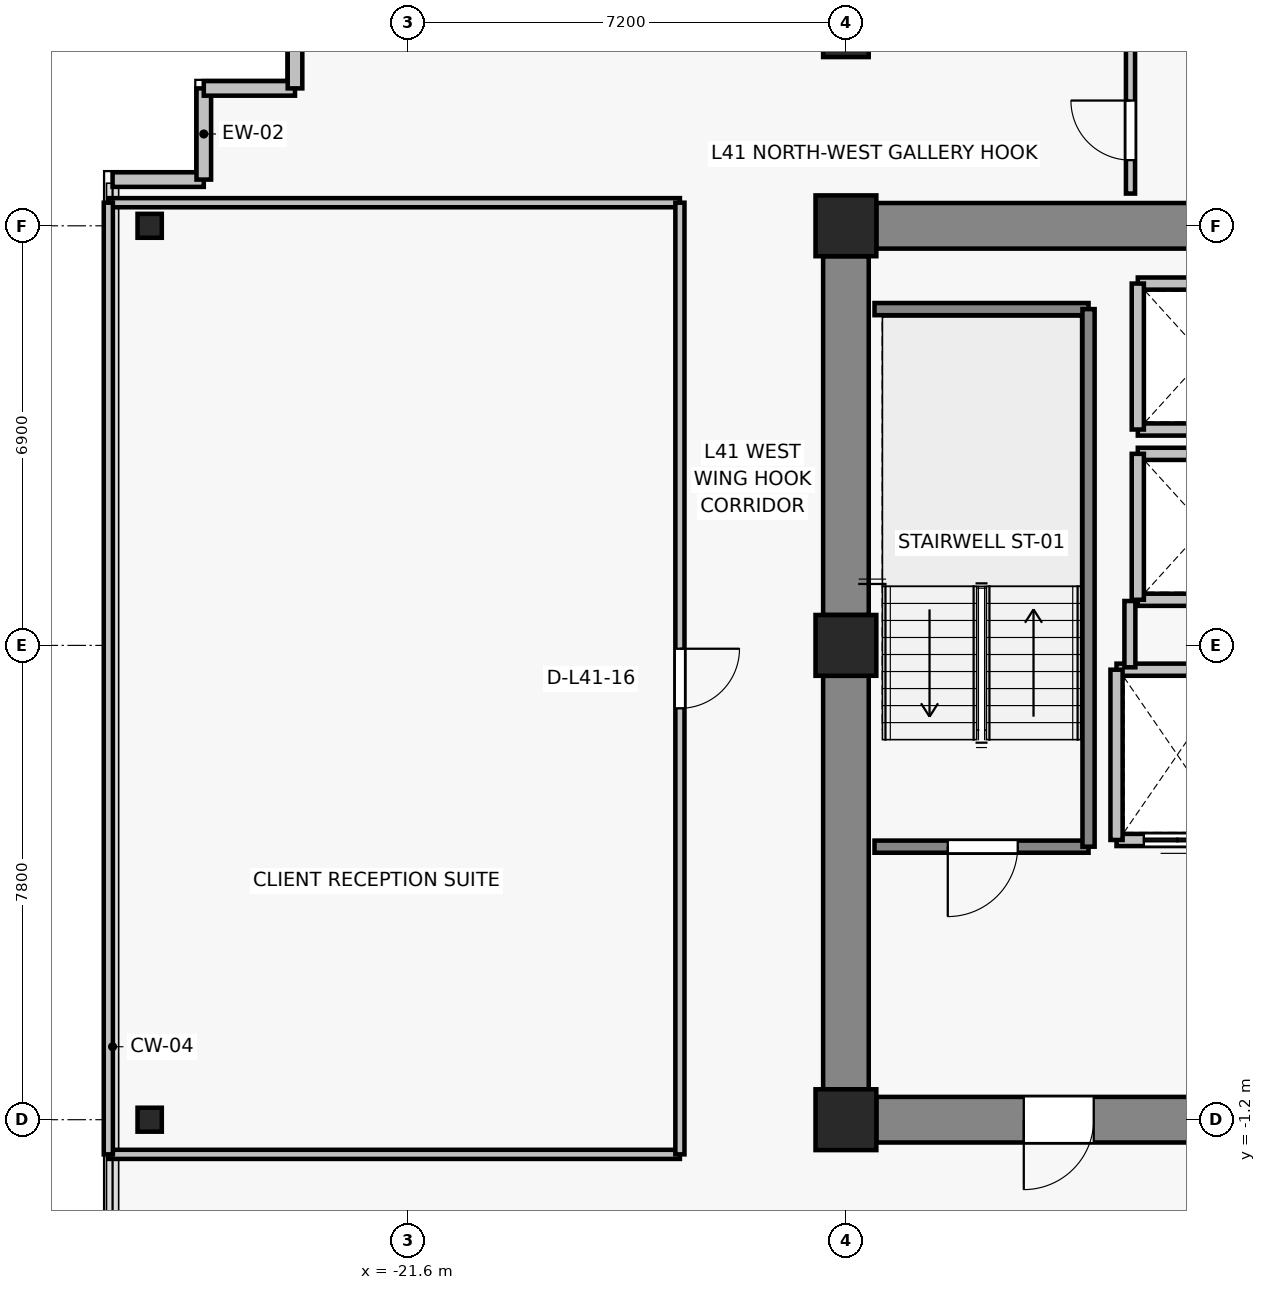
"""IFC4 building model, lengths in metres.
Left out: names, types, materials, properties, quantities, classifications, styles, units other than length and angle.
Written with IfcOpenShell. Run it as: python <this file> out.ifc"""

import sys

from ifc_helpers import new_model, si_unit, direction, frame, frame_2d, origin, origin_2d, place, context, subcontext, project, spatial, rectangle, i_section, extrude, source, transform, mapped, element, fill, save


model = new_model("IFC4")
c1 = context("Model", 3, precision=1e-05, world=origin(), true_north=direction((0.0, 1.0)))
c2 = subcontext(c1, "Body", "Model", "MODEL_VIEW")
j1 = project(units=[si_unit("LENGTHUNIT", "METRE"), si_unit("PLANEANGLEUNIT", "RADIAN")], contexts=[c1])
p1 = place(None, origin())
s1 = spatial("IfcSite", under=j1, at=p1, CompositionType="ELEMENT")
p2 = place(p1, origin())
s2 = spatial("IfcBuilding", under=s1, at=p2, CompositionType="ELEMENT")
p3 = place(p2, frame((0.0, 0.0, 149.5)))
s3 = spatial("IfcBuildingStorey", under=s2, at=p3, CompositionType="ELEMENT", Elevation=149.5)
for number, where, z_axis, x_axis in (
    (1, (-14.4, -1.2, 0.0), (0.0, 0.0, 1.0), (1.0, 0.0, 0.0)),
    (2, (-14.4, 6.6, 0.0), (0.0, 0.0, 1.0), (1.0, 0.0, 0.0)),
    (3, (-14.4, 13.5, 0.0), (0.0, 0.0, 1.0), (1.0, 0.0, 0.0)),
):
    element("IfcColumn", number, at=place(p3, frame(where, z_axis=z_axis, x_axis=x_axis)), inside=s3, PredefinedType="COLUMN", context=c2, shape_type="SweptSolid", body=[
        extrude(rectangle(XDim=1.0, YDim=1.0, at=origin_2d()), origin(), (0.0, 0.0, 1.0), 3.3),
    ])
p4 = place(p3, frame((-14.4, 16.65, 0.0), z_axis=(0.0, 0.0, 1.0), x_axis=(1.0, 0.0, 0.0)))
e4 = element("IfcColumn", 4, at=p4, inside=s3, PredefinedType="COLUMN", context=c2, shape_type="SweptSolid", body=[
    extrude(rectangle(XDim=0.75, YDim=0.75, at=origin_2d()), origin(), (0.0, 0.0, 1.0), 3.3),
])
for number, where, z_axis, x_axis in (
    (5, (-25.85, -1.2, 0.0), (0.0, 0.0, 1.0), (1.0, 0.0, 0.0)),
    (6, (-25.85, 13.5, 0.0), (0.0, 0.0, 1.0), (1.0, 0.0, 0.0)),
):
    element("IfcColumn", number, at=place(p3, frame(where, z_axis=z_axis, x_axis=x_axis)), inside=s3, PredefinedType="COLUMN", context=c2, shape_type="SweptSolid", body=[
        extrude(i_section(OverallWidth=0.399, OverallDepth=0.394, WebThickness=0.023, FlangeThickness=0.037, FilletRadius=0.015, at=origin_2d()), origin(), (0.0, 0.0, 1.0), 3.3),
    ])
p5 = place(p3, frame((-13.9, 13.5, 0.0), z_axis=(0.0, 0.0, 1.0), x_axis=(1.0, 0.0, 0.0)))
e7 = element("IfcWall", 7, at=p5, inside=s3, PredefinedType="SHEAR", context=c2, shape_type="SweptSolid", body=[
    extrude(rectangle(XDim=6.2, YDim=0.75, at=frame_2d((3.1, 0.0))), origin(), (0.0, 0.0, 1.0), 3.075),
])
p6 = place(p3, frame((-14.4, -0.7, 0.0), z_axis=(0.0, 0.0, 1.0), x_axis=(0.0, 1.0, 0.0)))
e8 = element("IfcWall", 8, at=p6, inside=s3, PredefinedType="SHEAR", context=c2, shape_type="SweptSolid", body=[
    extrude(rectangle(XDim=6.8, YDim=0.75, at=frame_2d((3.4, 0.0))), origin(), (0.0, 0.0, 1.0), 3.075),
])
p7 = place(p3, frame((-14.4, 7.1, 0.0), z_axis=(0.0, 0.0, 1.0), x_axis=(0.0, 1.0, 0.0)))
e9 = element("IfcWall", 9, at=p7, inside=s3, PredefinedType="SHEAR", context=c2, shape_type="SweptSolid", body=[
    extrude(rectangle(XDim=5.9, YDim=0.75, at=frame_2d((2.95, 0.0))), origin(), (0.0, 0.0, 1.0), 3.075),
])
p8 = place(p3, frame((-7.7, -1.2, 0.0), z_axis=(0.0, 0.0, 1.0), x_axis=(-1.0, 0.0, 0.0)))
e10 = element("IfcWall", 10, at=p8, inside=s3, PredefinedType="SHEAR", context=c2, shape_type="SweptSolid", body=[
    extrude(rectangle(XDim=6.2, YDim=0.75, at=frame_2d((3.1, 0.0))), origin(), (0.0, 0.0, 1.0), 3.075),
])
p9 = place(p8, frame((2.625, 0.0, 0.0)))
e11 = element("IfcOpeningElement", 11, at=p9, cuts=e10, PredefinedType="OPENING", context=c2, shape_type="SweptSolid", body=[
    extrude(rectangle(XDim=1.15, YDim=2.15, at=frame_2d((0.575, 1.075))), frame((0.0, 0.385, 0.0), z_axis=(0.0, -1.0, 0.0), x_axis=(1.0, 0.0, 0.0)), (0.0, 0.0, 1.0), 0.77),
])
for number, where, z_axis, x_axis in (
    (12, (-24.96, 14.26, 0.0), (0.0, 0.0, 1.0), (-1.0, 0.0, 0.0)),
    (13, (-24.96, 15.76, 0.0), (0.0, 0.0, 1.0), (0.0, -1.0, 0.0)),
    (14, (-23.46, 15.76, 0.0), (0.0, 0.0, 1.0), (-1.0, 0.0, 0.0)),
    (15, (-23.46, 17.26, 0.0), (0.0, 0.0, 1.0), (0.0, -1.0, 0.0)),
):
    element("IfcWall", number, at=place(p3, frame(where, z_axis=z_axis, x_axis=x_axis)), inside=s3, PredefinedType="SOLIDWALL", context=c2, shape_type="SweptSolid", body=[
        extrude(rectangle(XDim=1.5, YDim=0.24, at=frame_2d((0.75, 0.0))), origin(), (0.0, 0.0, 1.0), 3.075),
    ])
p10 = place(p3, frame((-7.95, 3.4, 0.0), z_axis=(0.0, 0.0, 1.0), x_axis=(-1.0, 0.0, 0.0)))
e16 = element("IfcWall", 16, at=p10, inside=s3, PredefinedType="SOLIDWALL", context=c2, shape_type="SweptSolid", body=[
    extrude(rectangle(XDim=2.0, YDim=0.2, at=frame_2d((1.0, 0.0))), origin(), (0.0, 0.0, 1.0), 3.075),
])
p11 = place(p10, frame((0.45, 0.0, 0.0)))
e17 = element("IfcOpeningElement", 17, at=p11, cuts=e16, PredefinedType="OPENING", context=c2, shape_type="SweptSolid", body=[
    extrude(rectangle(XDim=1.1, YDim=2.2, at=frame_2d((0.55, 1.1))), frame((0.0, 0.11, 0.0), z_axis=(0.0, -1.0, 0.0), x_axis=(1.0, 0.0, 0.0)), (0.0, 0.0, 1.0), 0.22),
])
p12 = place(p3, frame((-9.95, 6.2, 0.0), z_axis=(0.0, 0.0, 1.0), x_axis=(1.0, 0.0, 0.0)))
e18 = element("IfcWall", 18, at=p12, inside=s3, PredefinedType="SOLIDWALL", context=c2, shape_type="SweptSolid", body=[
    extrude(rectangle(XDim=2.0, YDim=0.2, at=frame_2d((1.0, 0.0))), origin(), (0.0, 0.0, 1.0), 3.075),
])
p13 = place(p3, frame((-9.95, 3.4, 0.0), z_axis=(0.0, 0.0, 1.0), x_axis=(0.0, 1.0, 0.0)))
e19 = element("IfcWall", 19, at=p13, inside=s3, PredefinedType="SOLIDWALL", context=c2, shape_type="SweptSolid", body=[
    extrude(rectangle(XDim=2.8, YDim=0.2, at=frame_2d((1.4, 0.0))), origin(), (0.0, 0.0, 1.0), 3.075),
])
for number, where, z_axis, x_axis in (
    (20, (-7.4, 7.35, 0.0), (0.0, 0.0, 1.0), (-1.0, 0.0, 0.0)),
    (21, (-9.6, 9.75, 0.0), (0.0, 0.0, 1.0), (1.0, 0.0, 0.0)),
):
    element("IfcWall", number, at=place(p3, frame(where, z_axis=z_axis, x_axis=x_axis)), inside=s3, PredefinedType="SOLIDWALL", context=c2, shape_type="SweptSolid", body=[
        extrude(rectangle(XDim=2.2, YDim=0.2, at=frame_2d((1.1, 0.0))), origin(), (0.0, 0.0, 1.0), 2.565),
    ])
p14 = place(p3, frame((-9.6, 7.35, 0.0), z_axis=(0.0, 0.0, 1.0), x_axis=(0.0, 1.0, 0.0)))
e22 = element("IfcWall", 22, at=p14, inside=s3, PredefinedType="SOLIDWALL", context=c2, shape_type="SweptSolid", body=[
    extrude(rectangle(XDim=2.4, YDim=0.2, at=frame_2d((1.2, 0.0))), origin(), (0.0, 0.0, 1.0), 3.075),
])
for number, where, z_axis, x_axis in (
    (23, (-7.4, 10.15, 0.0), (0.0, 0.0, 1.0), (-1.0, 0.0, 0.0)),
    (24, (-9.6, 12.55, 0.0), (0.0, 0.0, 1.0), (1.0, 0.0, 0.0)),
):
    element("IfcWall", number, at=place(p3, frame(where, z_axis=z_axis, x_axis=x_axis)), inside=s3, PredefinedType="SOLIDWALL", context=c2, shape_type="SweptSolid", body=[
        extrude(rectangle(XDim=2.2, YDim=0.2, at=frame_2d((1.1, 0.0))), origin(), (0.0, 0.0, 1.0), 2.565),
    ])
p15 = place(p3, frame((-9.6, 10.15, 0.0), z_axis=(0.0, 0.0, 1.0), x_axis=(0.0, 1.0, 0.0)))
e25 = element("IfcWall", 25, at=p15, inside=s3, PredefinedType="SOLIDWALL", context=c2, shape_type="SweptSolid", body=[
    extrude(rectangle(XDim=2.4, YDim=0.2, at=frame_2d((1.2, 0.0))), origin(), (0.0, 0.0, 1.0), 3.075),
])
p16 = place(p3, frame((-10.41, 3.29, 0.0), z_axis=(0.0, 0.0, 1.0), x_axis=(-1.0, 0.0, 0.0)))
e26 = element("IfcWall", 26, at=p16, inside=s3, PredefinedType="SOLIDWALL", context=c2, shape_type="SweptSolid", body=[
    extrude(rectangle(XDim=3.52, YDim=0.2, at=frame_2d((1.76, 0.0))), origin(), (0.0, 0.0, 1.0), 3.075),
])
p17 = place(p16, frame((1.165, 0.0, 0.0)))
e27 = element("IfcOpeningElement", 27, at=p17, cuts=e26, PredefinedType="OPENING", context=c2, shape_type="SweptSolid", body=[
    extrude(rectangle(XDim=1.15, YDim=2.15, at=frame_2d((0.575, 1.075))), frame((0.0, 0.11, 0.0), z_axis=(0.0, -1.0, 0.0), x_axis=(1.0, 0.0, 0.0)), (0.0, 0.0, 1.0), 0.22),
])
p18 = place(p3, frame((-13.93, 12.13, 0.0), z_axis=(0.0, 0.0, 1.0), x_axis=(1.0, 0.0, 0.0)))
e28 = element("IfcWall", 28, at=p18, inside=s3, PredefinedType="SOLIDWALL", context=c2, shape_type="SweptSolid", body=[
    extrude(rectangle(XDim=3.52, YDim=0.2, at=frame_2d((1.76, 0.0))), origin(), (0.0, 0.0, 1.0), 3.075),
])
p19 = place(p3, frame((-10.41, 12.13, 0.0), z_axis=(0.0, 0.0, 1.0), x_axis=(0.0, -1.0, 0.0)))
e29 = element("IfcWall", 29, at=p19, inside=s3, PredefinedType="SOLIDWALL", context=c2, shape_type="SweptSolid", body=[
    extrude(rectangle(XDim=8.84, YDim=0.2, at=frame_2d((4.42, 0.0))), origin(), (0.0, 0.0, 1.0), 3.075),
])
p20 = place(p3, frame((-9.73, 6.24, 0.0), z_axis=(0.0, 0.0, 1.0), x_axis=(0.0, 1.0, 0.0)))
e30 = element("IfcWall", 30, at=p20, inside=s3, PredefinedType="PARTITIONING", context=c2, shape_type="SweptSolid", body=[
    extrude(rectangle(XDim=1.09, YDim=0.18, at=frame_2d((0.545, 0.0))), origin(), (0.0, 0.0, 1.0), 3.075),
])
p21 = place(p3, frame((-17.13, -1.77, 0.0), z_axis=(0.0, 0.0, 1.0), x_axis=(-1.0, 0.0, 0.0)))
e31 = element("IfcWall", 31, at=p21, inside=s3, PredefinedType="PARTITIONING", context=c2, shape_type="SweptSolid", body=[
    extrude(rectangle(XDim=9.4, YDim=0.15, at=frame_2d((4.7, 0.0))), origin(), (0.0, 0.0, 1.0), 2.565),
])
p22 = place(p3, frame((-26.53, 13.88, 0.0), z_axis=(0.0, 0.0, 1.0), x_axis=(1.0, 0.0, 0.0)))
e32 = element("IfcWall", 32, at=p22, inside=s3, PredefinedType="PARTITIONING", context=c2, shape_type="SweptSolid", body=[
    extrude(rectangle(XDim=9.4, YDim=0.15, at=frame_2d((4.7, 0.0))), origin(), (0.0, 0.0, 1.0), 3.075),
])
p23 = place(p3, frame((-26.53, -1.77, 0.0), z_axis=(0.0, 0.0, 1.0), x_axis=(0.0, 1.0, 0.0)))
e33 = element("IfcWall", 33, at=p23, inside=s3, PredefinedType="PARTITIONING", context=c2, shape_type="SweptSolid", body=[
    extrude(rectangle(XDim=15.65, YDim=0.15, at=frame_2d((7.825, 0.0))), origin(), (0.0, 0.0, 1.0), 3.075),
])
p24 = place(p3, frame((-17.13, 13.88, 0.0), z_axis=(0.0, 0.0, 1.0), x_axis=(0.0, -1.0, 0.0)))
e34 = element("IfcWall", 34, at=p24, inside=s3, PredefinedType="PARTITIONING", context=c2, shape_type="SweptSolid", body=[
    extrude(rectangle(XDim=15.65, YDim=0.15, at=frame_2d((7.825, 0.0))), origin(), (0.0, 0.0, 1.0), 2.565),
])
p25 = place(p24, frame((7.335, 0.0, 0.0)))
e35 = element("IfcOpeningElement", 35, at=p25, cuts=e34, PredefinedType="OPENING", context=c2, shape_type="SweptSolid", body=[
    extrude(rectangle(XDim=0.98, YDim=2.15, at=frame_2d((0.49, 1.075))), frame((0.0, 0.085, 0.0), z_axis=(0.0, -1.0, 0.0), x_axis=(1.0, 0.0, 0.0)), (0.0, 0.0, 1.0), 0.17),
])
p26 = place(p3, frame((-9.72, 14.03, 0.0), z_axis=(0.0, 0.0, 1.0), x_axis=(0.0, 1.0, 0.0)))
e36 = element("IfcWall", 36, at=p26, inside=s3, PredefinedType="PARTITIONING", context=c2, shape_type="SweptSolid", body=[
    extrude(rectangle(XDim=3.3, YDim=0.15, at=frame_2d((1.65, 0.0))), origin(), (0.0, 0.0, 1.0), 2.565),
])
p27 = place(p26, frame((0.55, 0.0, 0.0)))
e37 = element("IfcOpeningElement", 37, at=p27, cuts=e36, PredefinedType="OPENING", context=c2, shape_type="SweptSolid", body=[
    extrude(rectangle(XDim=0.98, YDim=2.15, at=frame_2d((0.49, 1.075))), frame((0.0, 0.085, 0.0), z_axis=(0.0, -1.0, 0.0), x_axis=(1.0, 0.0, 0.0)), (0.0, 0.0, 1.0), 0.17),
])
m1 = source(origin(), c2, "Body", "SweptSolid", [
    extrude(rectangle(XDim=1.1, YDim=2.2, at=frame_2d((0.55, 1.1))), frame((0.0, 0.025, 0.0), z_axis=(0.0, -1.0, 0.0), x_axis=(1.0, 0.0, 0.0)), (0.0, 0.0, 1.0), 0.05),
])
p28 = place(p11, origin())
e38 = element("IfcDoor", 38, at=p28, inside=s3, OperationType="DOUBLE_DOOR_SLIDING", PredefinedType="DOOR", context=c2, shape_type="MappedRepresentation", body=[
    mapped(m1, transform((0.0, 0.0, 0.0), x_axis=(1.0, 0.0, 0.0), y_axis=(0.0, 1.0, 0.0), z_axis=(0.0, 0.0, 1.0), scale=1.0)),
])
fill(e17, e38)
m2 = source(origin(), c2, "Body", "SweptSolid", [
    extrude(rectangle(XDim=1.15, YDim=2.15, at=frame_2d((0.575, 1.075))), frame((0.0, 0.025, 0.0), z_axis=(0.0, -1.0, 0.0), x_axis=(1.0, 0.0, 0.0)), (0.0, 0.0, 1.0), 0.05),
])
p29 = place(p17, origin())
e39 = element("IfcDoor", 39, at=p29, inside=s3, OperationType="SINGLE_SWING_RIGHT", PredefinedType="DOOR", context=c2, shape_type="MappedRepresentation", body=[
    mapped(m2, transform((0.0, 0.0, 0.0), x_axis=(1.0, 0.0, 0.0), y_axis=(0.0, 1.0, 0.0), z_axis=(0.0, 0.0, 1.0), scale=1.0)),
])
fill(e27, e39)
p30 = place(p9, origin())
e40 = element("IfcDoor", 40, at=p30, inside=s3, OperationType="SINGLE_SWING_RIGHT", PredefinedType="DOOR", context=c2, shape_type="MappedRepresentation", body=[
    mapped(m2, transform((0.0, 0.0, 0.0), x_axis=(1.0, 0.0, 0.0), y_axis=(0.0, 1.0, 0.0), z_axis=(0.0, 0.0, 1.0), scale=1.0)),
])
fill(e11, e40)
m3 = source(origin(), c2, "Body", "SweptSolid", [
    extrude(rectangle(XDim=0.98, YDim=2.15, at=frame_2d((0.49, 1.075))), frame((0.0, 0.025, 0.0), z_axis=(0.0, -1.0, 0.0), x_axis=(1.0, 0.0, 0.0)), (0.0, 0.0, 1.0), 0.05),
])
p31 = place(p25, origin())
e41 = element("IfcDoor", 41, at=p31, inside=s3, OperationType="SINGLE_SWING_LEFT", PredefinedType="DOOR", context=c2, shape_type="MappedRepresentation", body=[
    mapped(m3, transform((0.0, 0.0, 0.0), x_axis=(1.0, 0.0, 0.0), y_axis=(0.0, 1.0, 0.0), z_axis=(0.0, 0.0, 1.0), scale=1.0)),
])
fill(e35, e41)
p32 = place(p27, origin())
e42 = element("IfcDoor", 42, at=p32, inside=s3, OperationType="SINGLE_SWING_RIGHT", PredefinedType="DOOR", context=c2, shape_type="MappedRepresentation", body=[
    mapped(m3, transform((0.0, 0.0, 0.0), x_axis=(1.0, 0.0, 0.0), y_axis=(0.0, 1.0, 0.0), z_axis=(0.0, 0.0, 1.0), scale=1.0)),
])
fill(e37, e42)
save(model, sys.argv[1])
